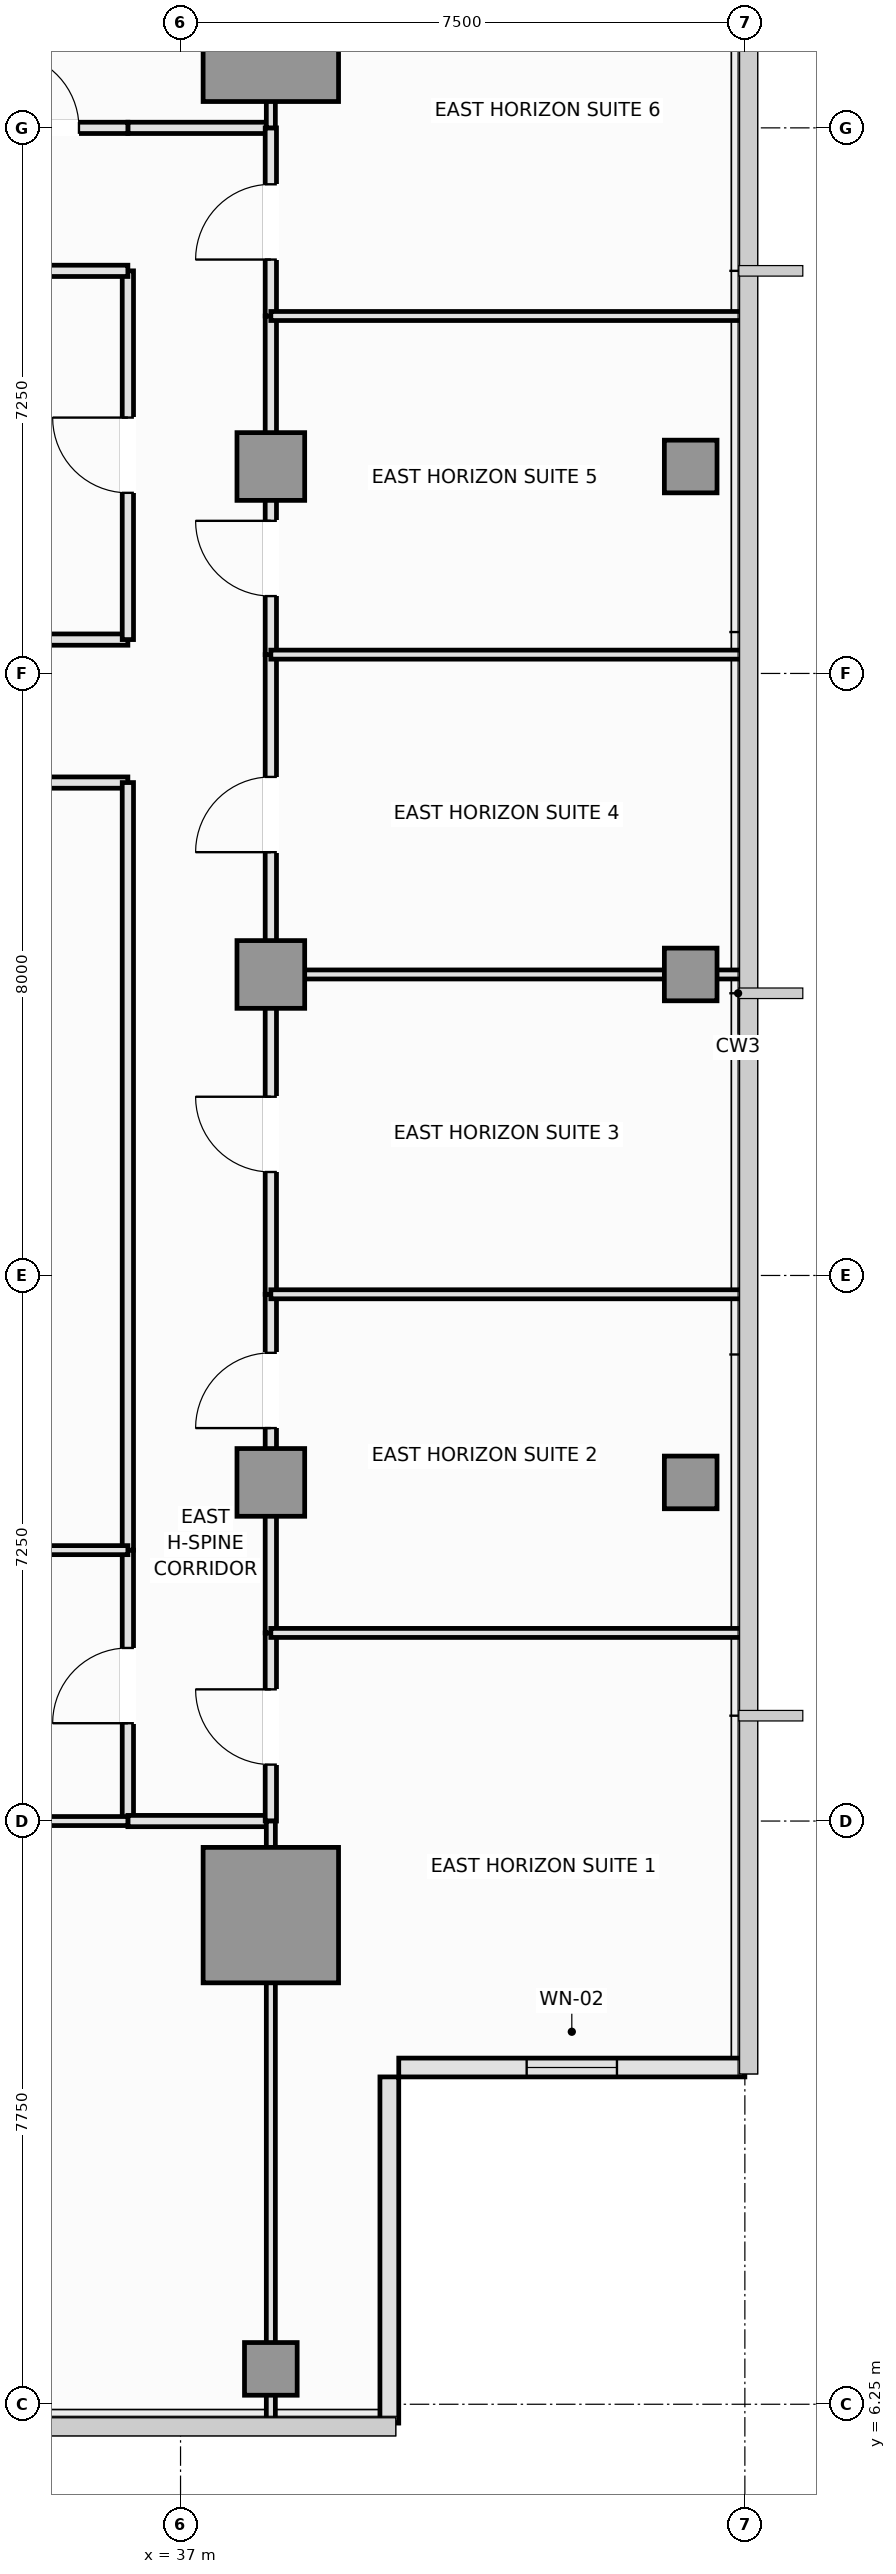
"""IFC4 building model, lengths in metres.
Left out: names, types, materials, properties, quantities, classifications, styles, units other than length and angle.
Written with IfcOpenShell. Run it as: python <this file> out.ifc"""

import sys

from ifc_helpers import new_model, si_unit, direction, frame, frame_2d, origin, origin_2d, place, context, subcontext, project, spatial, rectangle, extrude, element, fill, save


model = new_model("IFC4")
c1 = context("Model", 3, precision=1e-05, world=origin(), true_north=direction((0.0, 1.0)))
c2 = subcontext(c1, "Body", "Model", "MODEL_VIEW")
j1 = project(units=[si_unit("LENGTHUNIT", "METRE"), si_unit("PLANEANGLEUNIT", "RADIAN")], contexts=[c1])
p1 = place(None, origin())
s1 = spatial("IfcSite", under=j1, at=p1, CompositionType="ELEMENT")
p2 = place(p1, origin())
s2 = spatial("IfcBuilding", under=s1, at=p2, CompositionType="ELEMENT")
p3 = place(p2, frame((0.0, 0.0, 284.75)))
s3 = spatial("IfcBuildingStorey", under=s2, at=p3, CompositionType="ELEMENT", Elevation=284.75)
for number, where, z_axis, x_axis in (
    (1, (38.2, 12.75, 0.0), (0.0, 0.0, 1.0), (1.0, 0.0, 0.0)),
    (2, (38.2, 37.75, 0.0), (0.0, 0.0, 1.0), (1.0, 0.0, 0.0)),
):
    element("IfcColumn", number, at=place(p3, frame(where, z_axis=z_axis, x_axis=x_axis)), inside=s3, PredefinedType="COLUMN", context=c2, shape_type="SweptSolid", body=[
        extrude(rectangle(XDim=1.8, YDim=1.8, at=origin_2d()), origin(), (0.0, 0.0, 1.0), 3.55),
    ])
for number, where, z_axis, x_axis in (
    (3, (38.2, 18.5, 0.0), (0.0, 0.0, 1.0), (1.0, 0.0, 0.0)),
    (4, (38.2, 25.25, 0.0), (0.0, 0.0, 1.0), (1.0, 0.0, 0.0)),
    (5, (38.2, 32.0, 0.0), (0.0, 0.0, 1.0), (1.0, 0.0, 0.0)),
):
    element("IfcColumn", number, at=place(p3, frame(where, z_axis=z_axis, x_axis=x_axis)), inside=s3, PredefinedType="COLUMN", context=c2, shape_type="SweptSolid", body=[
        extrude(rectangle(XDim=0.9, YDim=0.9, at=origin_2d()), origin(), (0.0, 0.0, 1.0), 3.55),
    ])
for number, where, z_axis, x_axis in (
    (6, (43.78, 18.5, 0.0), (0.0, 0.0, 1.0), (1.0, 0.0, 0.0)),
    (7, (43.78, 25.25, 0.0), (0.0, 0.0, 1.0), (1.0, 0.0, 0.0)),
    (8, (43.78, 32.0, 0.0), (0.0, 0.0, 1.0), (1.0, 0.0, 0.0)),
    (9, (38.2, 6.72, 0.0), (0.0, 0.0, 1.0), (1.0, 0.0, 0.0)),
):
    element("IfcColumn", number, at=place(p3, frame(where, z_axis=z_axis, x_axis=x_axis)), inside=s3, PredefinedType="COLUMN", context=c2, shape_type="SweptSolid", body=[
        extrude(rectangle(XDim=0.7, YDim=0.7, at=origin_2d()), origin(), (0.0, 0.0, 1.0), 3.55),
    ])
p4 = place(p3, frame((39.775, 6.0, 0.0), z_axis=(0.0, 0.0, 1.0), x_axis=(0.0, 1.0, 0.0)))
e10 = element("IfcWall", 10, at=p4, inside=s3, PredefinedType="SOLIDWALL", context=c2, shape_type="SweptSolid", body=[
    extrude(rectangle(XDim=4.6, YDim=0.25, at=frame_2d((2.3, 0.0))), origin(), (0.0, 0.0, 1.0), 3.39),
])
p5 = place(p3, frame((39.9, 10.725, 0.0), z_axis=(0.0, 0.0, 1.0), x_axis=(1.0, 0.0, 0.0)))
e11 = element("IfcWall", 11, at=p5, inside=s3, PredefinedType="SOLIDWALL", context=c2, shape_type="SweptSolid", body=[
    extrude(rectangle(XDim=4.6, YDim=0.25, at=frame_2d((2.3, 0.0))), origin(), (0.0, 0.0, 1.0), 3.39),
])
p6 = place(p5, frame((1.7, 0.0, 0.9)))
e12 = element("IfcOpeningElement", 12, at=p6, cuts=e11, PredefinedType="OPENING", context=c2, shape_type="SweptSolid", body=[
    extrude(rectangle(XDim=1.2, YDim=1.8, at=frame_2d((0.6, 0.9))), frame((0.0, 0.135, 0.0), z_axis=(0.0, -1.0, 0.0), x_axis=(1.0, 0.0, 0.0)), (0.0, 0.0, 1.0), 0.27),
])
p7 = place(p3, frame((26.79, 29.7, 0.0), z_axis=(0.0, 0.0, 1.0), x_axis=(1.0, 0.0, 0.0)))
e13 = element("IfcWall", 13, at=p7, inside=s3, PredefinedType="PARTITIONING", context=c2, shape_type="SweptSolid", body=[
    extrude(rectangle(XDim=9.51, YDim=0.15, at=frame_2d((4.755, 0.0))), origin(), (0.0, 0.0, 1.0), 3.39),
])
p8 = place(p3, frame((23.5, 27.8, 0.0), z_axis=(0.0, 0.0, 1.0), x_axis=(1.0, 0.0, 0.0)))
e14 = element("IfcWall", 14, at=p8, inside=s3, PredefinedType="PARTITIONING", context=c2, shape_type="SweptSolid", body=[
    extrude(rectangle(XDim=12.8, YDim=0.15, at=frame_2d((6.4, 0.0))), origin(), (0.0, 0.0, 1.0), 3.39),
])
p9 = place(p8, frame((5.9, 0.0, 0.0)))
e15 = element("IfcOpeningElement", 15, at=p9, cuts=e14, PredefinedType="OPENING", context=c2, shape_type="SweptSolid", body=[
    extrude(rectangle(XDim=1.0, YDim=2.15, at=frame_2d((0.5, 1.075))), frame((0.0, 0.085, 0.0), z_axis=(0.0, -1.0, 0.0), x_axis=(1.0, 0.0, 0.0)), (0.0, 0.0, 1.0), 0.17),
])
p10 = place(p3, frame((36.3, 29.7, 0.0), z_axis=(0.0, 0.0, 1.0), x_axis=(0.0, 1.0, 0.0)))
e16 = element("IfcWall", 16, at=p10, inside=s3, PredefinedType="PARTITIONING", context=c2, shape_type="SweptSolid", body=[
    extrude(rectangle(XDim=4.9, YDim=0.15, at=frame_2d((2.45, 0.0))), origin(), (0.0, 0.0, 1.0), 3.39),
])
p11 = place(p10, frame((1.95, 0.0, 0.0)))
e17 = element("IfcOpeningElement", 17, at=p11, cuts=e16, PredefinedType="OPENING", context=c2, shape_type="SweptSolid", body=[
    extrude(rectangle(XDim=1.0, YDim=2.15, at=frame_2d((0.5, 1.075))), frame((0.0, 0.085, 0.0), z_axis=(0.0, -1.0, 0.0), x_axis=(1.0, 0.0, 0.0)), (0.0, 0.0, 1.0), 0.17),
])
p12 = place(p3, frame((36.3, 14.0, 0.0), z_axis=(0.0, 0.0, 1.0), x_axis=(0.0, 1.0, 0.0)))
e18 = element("IfcWall", 18, at=p12, inside=s3, PredefinedType="PARTITIONING", context=c2, shape_type="SweptSolid", body=[
    extrude(rectangle(XDim=3.6, YDim=0.15, at=frame_2d((1.8, 0.0))), origin(), (0.0, 0.0, 1.0), 3.39),
])
p13 = place(p12, frame((1.3, 0.0, 0.0)))
e19 = element("IfcOpeningElement", 19, at=p13, cuts=e18, PredefinedType="OPENING", context=c2, shape_type="SweptSolid", body=[
    extrude(rectangle(XDim=1.0, YDim=2.15, at=frame_2d((0.5, 1.075))), frame((0.0, 0.085, 0.0), z_axis=(0.0, -1.0, 0.0), x_axis=(1.0, 0.0, 0.0)), (0.0, 0.0, 1.0), 0.17),
])
p14 = place(p3, frame((36.3, 17.6, 0.0), z_axis=(0.0, 0.0, 1.0), x_axis=(0.0, 1.0, 0.0)))
e20 = element("IfcWall", 20, at=p14, inside=s3, PredefinedType="PARTITIONING", context=c2, shape_type="SweptSolid", body=[
    extrude(rectangle(XDim=10.2, YDim=0.15, at=frame_2d((5.1, 0.0))), origin(), (0.0, 0.0, 1.0), 3.39),
])
for number, where, z_axis, x_axis in (
    (21, (36.3, 14.0, 0.0), (0.0, 0.0, 1.0), (1.0, 0.0, 0.0)),
    (22, (36.3, 36.5, 0.0), (0.0, 0.0, 1.0), (1.0, 0.0, 0.0)),
):
    element("IfcWall", number, at=place(p3, frame(where, z_axis=z_axis, x_axis=x_axis)), inside=s3, PredefinedType="PARTITIONING", context=c2, shape_type="SweptSolid", body=[
        extrude(rectangle(XDim=1.9, YDim=0.15, at=frame_2d((0.95, 0.0))), origin(), (0.0, 0.0, 1.0), 3.39),
    ])
p15 = place(p3, frame((38.2, 14.0, 0.0), z_axis=(0.0, 0.0, 1.0), x_axis=(0.0, 1.0, 0.0)))
e23 = element("IfcWall", 23, at=p15, inside=s3, PredefinedType="PARTITIONING", context=c2, shape_type="SweptSolid", body=[
    extrude(rectangle(XDim=2.5, YDim=0.15, at=frame_2d((1.25, 0.0))), origin(), (0.0, 0.0, 1.0), 2.99),
])
p16 = place(p15, frame((0.75, 0.0, 0.0)))
e24 = element("IfcOpeningElement", 24, at=p16, cuts=e23, PredefinedType="OPENING", context=c2, shape_type="SweptSolid", body=[
    extrude(rectangle(XDim=1.0, YDim=2.15, at=frame_2d((0.5, 1.075))), frame((0.0, 0.085, 0.0), z_axis=(0.0, -1.0, 0.0), x_axis=(1.0, 0.0, 0.0)), (0.0, 0.0, 1.0), 0.17),
])
p17 = place(p3, frame((38.2, 16.5, 0.0), z_axis=(0.0, 0.0, 1.0), x_axis=(0.0, 1.0, 0.0)))
e25 = element("IfcWall", 25, at=p17, inside=s3, PredefinedType="PARTITIONING", context=c2, shape_type="SweptSolid", body=[
    extrude(rectangle(XDim=4.5, YDim=0.15, at=frame_2d((2.25, 0.0))), origin(), (0.0, 0.0, 1.0), 2.99),
])
p18 = place(p17, frame((2.722, 0.0, 0.0)))
e26 = element("IfcOpeningElement", 26, at=p18, cuts=e25, PredefinedType="OPENING", context=c2, shape_type="SweptSolid", body=[
    extrude(rectangle(XDim=1.0, YDim=2.15, at=frame_2d((0.5, 1.075))), frame((0.0, 0.085, 0.0), z_axis=(0.0, -1.0, 0.0), x_axis=(1.0, 0.0, 0.0)), (0.0, 0.0, 1.0), 0.17),
])
p19 = place(p3, frame((38.2, 21.0, 0.0), z_axis=(0.0, 0.0, 1.0), x_axis=(0.0, 1.0, 0.0)))
e27 = element("IfcWall", 27, at=p19, inside=s3, PredefinedType="PARTITIONING", context=c2, shape_type="SweptSolid", body=[
    extrude(rectangle(XDim=4.25, YDim=0.15, at=frame_2d((2.125, 0.0))), origin(), (0.0, 0.0, 1.0), 2.99),
])
p20 = place(p19, frame((1.625, 0.0, 0.0)))
e28 = element("IfcOpeningElement", 28, at=p20, cuts=e27, PredefinedType="OPENING", context=c2, shape_type="SweptSolid", body=[
    extrude(rectangle(XDim=1.0, YDim=2.15, at=frame_2d((0.5, 1.075))), frame((0.0, 0.085, 0.0), z_axis=(0.0, -1.0, 0.0), x_axis=(1.0, 0.0, 0.0)), (0.0, 0.0, 1.0), 0.17),
])
p21 = place(p3, frame((38.2, 25.25, 0.0), z_axis=(0.0, 0.0, 1.0), x_axis=(0.0, 1.0, 0.0)))
e29 = element("IfcWall", 29, at=p21, inside=s3, PredefinedType="PARTITIONING", context=c2, shape_type="SweptSolid", body=[
    extrude(rectangle(XDim=4.25, YDim=0.15, at=frame_2d((2.125, 0.0))), origin(), (0.0, 0.0, 1.0), 2.99),
])
p22 = place(p21, frame((1.625, 0.0, 0.0)))
e30 = element("IfcOpeningElement", 30, at=p22, cuts=e29, PredefinedType="OPENING", context=c2, shape_type="SweptSolid", body=[
    extrude(rectangle(XDim=1.0, YDim=2.15, at=frame_2d((0.5, 1.075))), frame((0.0, 0.085, 0.0), z_axis=(0.0, -1.0, 0.0), x_axis=(1.0, 0.0, 0.0)), (0.0, 0.0, 1.0), 0.17),
])
p23 = place(p3, frame((38.2, 29.5, 0.0), z_axis=(0.0, 0.0, 1.0), x_axis=(0.0, 1.0, 0.0)))
e31 = element("IfcWall", 31, at=p23, inside=s3, PredefinedType="PARTITIONING", context=c2, shape_type="SweptSolid", body=[
    extrude(rectangle(XDim=4.5, YDim=0.15, at=frame_2d((2.25, 0.0))), origin(), (0.0, 0.0, 1.0), 2.99),
])
p24 = place(p23, frame((0.778, 0.0, 0.0)))
e32 = element("IfcOpeningElement", 32, at=p24, cuts=e31, PredefinedType="OPENING", context=c2, shape_type="SweptSolid", body=[
    extrude(rectangle(XDim=1.0, YDim=2.15, at=frame_2d((0.5, 1.075))), frame((0.0, 0.085, 0.0), z_axis=(0.0, -1.0, 0.0), x_axis=(1.0, 0.0, 0.0)), (0.0, 0.0, 1.0), 0.17),
])
p25 = place(p3, frame((38.2, 34.0, 0.0), z_axis=(0.0, 0.0, 1.0), x_axis=(0.0, 1.0, 0.0)))
e33 = element("IfcWall", 33, at=p25, inside=s3, PredefinedType="PARTITIONING", context=c2, shape_type="SweptSolid", body=[
    extrude(rectangle(XDim=2.5, YDim=0.15, at=frame_2d((1.25, 0.0))), origin(), (0.0, 0.0, 1.0), 2.99),
])
p26 = place(p25, frame((0.75, 0.0, 0.0)))
e34 = element("IfcOpeningElement", 34, at=p26, cuts=e33, PredefinedType="OPENING", context=c2, shape_type="SweptSolid", body=[
    extrude(rectangle(XDim=1.0, YDim=2.15, at=frame_2d((0.5, 1.075))), frame((0.0, 0.085, 0.0), z_axis=(0.0, -1.0, 0.0), x_axis=(1.0, 0.0, 0.0)), (0.0, 0.0, 1.0), 0.17),
])
p27 = place(p3, frame((26.79, 34.6, 0.0), z_axis=(0.0, 0.0, 1.0), x_axis=(1.0, 0.0, 0.0)))
e35 = element("IfcWall", 35, at=p27, inside=s3, PredefinedType="PARTITIONING", context=c2, shape_type="SweptSolid", body=[
    extrude(rectangle(XDim=9.51, YDim=0.15, at=frame_2d((4.755, 0.0))), origin(), (0.0, 0.0, 1.0), 3.39),
])
p28 = place(p3, frame((34.0, 36.5, 0.0), z_axis=(0.0, 0.0, 1.0), x_axis=(1.0, 0.0, 0.0)))
e36 = element("IfcWall", 36, at=p28, inside=s3, PredefinedType="PARTITIONING", context=c2, shape_type="SweptSolid", body=[
    extrude(rectangle(XDim=2.3, YDim=0.15, at=frame_2d((1.15, 0.0))), origin(), (0.0, 0.0, 1.0), 3.39),
])
p29 = place(p28, frame((0.65, 0.0, 0.0)))
e37 = element("IfcOpeningElement", 37, at=p29, cuts=e36, PredefinedType="OPENING", context=c2, shape_type="SweptSolid", body=[
    extrude(rectangle(XDim=1.0, YDim=2.15, at=frame_2d((0.5, 1.075))), frame((0.0, 0.085, 0.0), z_axis=(0.0, -1.0, 0.0), x_axis=(1.0, 0.0, 0.0)), (0.0, 0.0, 1.0), 0.17),
])
for number, where, z_axis, x_axis in (
    (38, (23.5, 17.6, 0.0), (0.0, 0.0, 1.0), (1.0, 0.0, 0.0)),
    (39, (23.5, 14.0, 0.0), (0.0, 0.0, 1.0), (1.0, 0.0, 0.0)),
):
    element("IfcWall", number, at=place(p3, frame(where, z_axis=z_axis, x_axis=x_axis)), inside=s3, PredefinedType="PARTITIONING", context=c2, shape_type="SweptSolid", body=[
        extrude(rectangle(XDim=12.8, YDim=0.12, at=frame_2d((6.4, 0.0))), origin(), (0.0, 0.0, 1.0), 3.39),
    ])
p30 = place(p3, frame((38.2, 6.01, 0.0), z_axis=(0.0, 0.0, 1.0), x_axis=(0.0, 1.0, 0.0)))
e40 = element("IfcWall", 40, at=p30, inside=s3, PredefinedType="PARTITIONING", context=c2, shape_type="SweptSolid", body=[
    extrude(rectangle(XDim=7.99, YDim=0.12, at=frame_2d((3.995, 0.0))), origin(), (0.0, 0.0, 1.0), 2.99),
])
p31 = place(p3, frame((38.2, 36.5, 0.0), z_axis=(0.0, 0.0, 1.0), x_axis=(0.0, 1.0, 0.0)))
e41 = element("IfcWall", 41, at=p31, inside=s3, PredefinedType="PARTITIONING", context=c2, shape_type="SweptSolid", body=[
    extrude(rectangle(XDim=7.49, YDim=0.12, at=frame_2d((3.745, 0.0))), origin(), (0.0, 0.0, 1.0), 2.99),
])
for number, where, z_axis, x_axis in (
    (42, (38.2, 16.5, 0.0), (0.0, 0.0, 1.0), (1.0, 0.0, 0.0)),
    (43, (38.2, 21.0, 0.0), (0.0, 0.0, 1.0), (1.0, 0.0, 0.0)),
):
    element("IfcWall", number, at=place(p3, frame(where, z_axis=z_axis, x_axis=x_axis)), inside=s3, PredefinedType="PARTITIONING", context=c2, shape_type="SweptSolid", body=[
        extrude(rectangle(XDim=6.29, YDim=0.12, at=frame_2d((3.145, 0.0))), origin(), (0.0, 0.0, 1.0), 3.39),
    ])
p32 = place(p3, frame((38.2, 25.25, 0.0), z_axis=(0.0, 0.0, 1.0), x_axis=(1.0, 0.0, 0.0)))
e44 = element("IfcWall", 44, at=p32, inside=s3, PredefinedType="PARTITIONING", context=c2, shape_type="SweptSolid", body=[
    extrude(rectangle(XDim=6.29, YDim=0.12, at=frame_2d((3.145, 0.0))), origin(), (0.0, 0.0, 1.0), 2.94),
])
for number, where, z_axis, x_axis in (
    (45, (38.2, 29.5, 0.0), (0.0, 0.0, 1.0), (1.0, 0.0, 0.0)),
    (46, (38.2, 34.0, 0.0), (0.0, 0.0, 1.0), (1.0, 0.0, 0.0)),
):
    element("IfcWall", number, at=place(p3, frame(where, z_axis=z_axis, x_axis=x_axis)), inside=s3, PredefinedType="PARTITIONING", context=c2, shape_type="SweptSolid", body=[
        extrude(rectangle(XDim=6.29, YDim=0.12, at=frame_2d((3.145, 0.0))), origin(), (0.0, 0.0, 1.0), 3.39),
    ])
p33 = place(p6, origin())
e47 = element("IfcWindow", 47, at=p33, inside=s3, PartitioningType="SINGLE_PANEL", PredefinedType="WINDOW", context=c2, shape_type="SweptSolid", body=[
    extrude(rectangle(XDim=1.2, YDim=1.8, at=frame_2d((0.6, 0.9))), frame((0.0, 0.03, 0.0), z_axis=(0.0, -1.0, 0.0), x_axis=(1.0, 0.0, 0.0)), (0.0, 0.0, 1.0), 0.06),
])
fill(e12, e47)
p34 = place(p11, origin())
e48 = element("IfcDoor", 48, at=p34, inside=s3, OperationType="SINGLE_SWING_RIGHT", PredefinedType="DOOR", context=c2, shape_type="SweptSolid", body=[
    extrude(rectangle(XDim=1.0, YDim=2.15, at=frame_2d((0.5, 1.075))), frame((0.0, 0.025, 0.0), z_axis=(0.0, -1.0, 0.0), x_axis=(1.0, 0.0, 0.0)), (0.0, 0.0, 1.0), 0.05),
])
fill(e17, e48)
p35 = place(p13, origin())
e49 = element("IfcDoor", 49, at=p35, inside=s3, OperationType="SINGLE_SWING_LEFT", PredefinedType="DOOR", context=c2, shape_type="SweptSolid", body=[
    extrude(rectangle(XDim=1.0, YDim=2.15, at=frame_2d((0.5, 1.075))), frame((0.0, 0.025, 0.0), z_axis=(0.0, -1.0, 0.0), x_axis=(1.0, 0.0, 0.0)), (0.0, 0.0, 1.0), 0.05),
])
fill(e19, e49)
p36 = place(p16, origin())
e50 = element("IfcDoor", 50, at=p36, inside=s3, OperationType="SINGLE_SWING_RIGHT", PredefinedType="DOOR", context=c2, shape_type="SweptSolid", body=[
    extrude(rectangle(XDim=1.0, YDim=2.15, at=frame_2d((0.5, 1.075))), frame((0.0, 0.025, 0.0), z_axis=(0.0, -1.0, 0.0), x_axis=(1.0, 0.0, 0.0)), (0.0, 0.0, 1.0), 0.05),
])
fill(e24, e50)
p37 = place(p18, origin())
e51 = element("IfcDoor", 51, at=p37, inside=s3, OperationType="SINGLE_SWING_LEFT", PredefinedType="DOOR", context=c2, shape_type="SweptSolid", body=[
    extrude(rectangle(XDim=1.0, YDim=2.15, at=frame_2d((0.5, 1.075))), frame((0.0, 0.025, 0.0), z_axis=(0.0, -1.0, 0.0), x_axis=(1.0, 0.0, 0.0)), (0.0, 0.0, 1.0), 0.05),
])
fill(e26, e51)
p38 = place(p20, origin())
e52 = element("IfcDoor", 52, at=p38, inside=s3, OperationType="SINGLE_SWING_RIGHT", PredefinedType="DOOR", context=c2, shape_type="SweptSolid", body=[
    extrude(rectangle(XDim=1.0, YDim=2.15, at=frame_2d((0.5, 1.075))), frame((0.0, 0.025, 0.0), z_axis=(0.0, -1.0, 0.0), x_axis=(1.0, 0.0, 0.0)), (0.0, 0.0, 1.0), 0.05),
])
fill(e28, e52)
p39 = place(p22, origin())
e53 = element("IfcDoor", 53, at=p39, inside=s3, OperationType="SINGLE_SWING_LEFT", PredefinedType="DOOR", context=c2, shape_type="SweptSolid", body=[
    extrude(rectangle(XDim=1.0, YDim=2.15, at=frame_2d((0.5, 1.075))), frame((0.0, 0.025, 0.0), z_axis=(0.0, -1.0, 0.0), x_axis=(1.0, 0.0, 0.0)), (0.0, 0.0, 1.0), 0.05),
])
fill(e30, e53)
p40 = place(p24, origin())
e54 = element("IfcDoor", 54, at=p40, inside=s3, OperationType="SINGLE_SWING_RIGHT", PredefinedType="DOOR", context=c2, shape_type="SweptSolid", body=[
    extrude(rectangle(XDim=1.0, YDim=2.15, at=frame_2d((0.5, 1.075))), frame((0.0, 0.025, 0.0), z_axis=(0.0, -1.0, 0.0), x_axis=(1.0, 0.0, 0.0)), (0.0, 0.0, 1.0), 0.05),
])
fill(e32, e54)
p41 = place(p26, origin())
e55 = element("IfcDoor", 55, at=p41, inside=s3, OperationType="SINGLE_SWING_LEFT", PredefinedType="DOOR", context=c2, shape_type="SweptSolid", body=[
    extrude(rectangle(XDim=1.0, YDim=2.15, at=frame_2d((0.5, 1.075))), frame((0.0, 0.025, 0.0), z_axis=(0.0, -1.0, 0.0), x_axis=(1.0, 0.0, 0.0)), (0.0, 0.0, 1.0), 0.05),
])
fill(e34, e55)
p42 = place(p29, origin())
e56 = element("IfcDoor", 56, at=p42, inside=s3, OperationType="SINGLE_SWING_LEFT", PredefinedType="DOOR", context=c2, shape_type="SweptSolid", body=[
    extrude(rectangle(XDim=1.0, YDim=2.15, at=frame_2d((0.5, 1.075))), frame((0.0, 0.025, 0.0), z_axis=(0.0, -1.0, 0.0), x_axis=(1.0, 0.0, 0.0)), (0.0, 0.0, 1.0), 0.05),
])
fill(e37, e56)
save(model, sys.argv[1])
